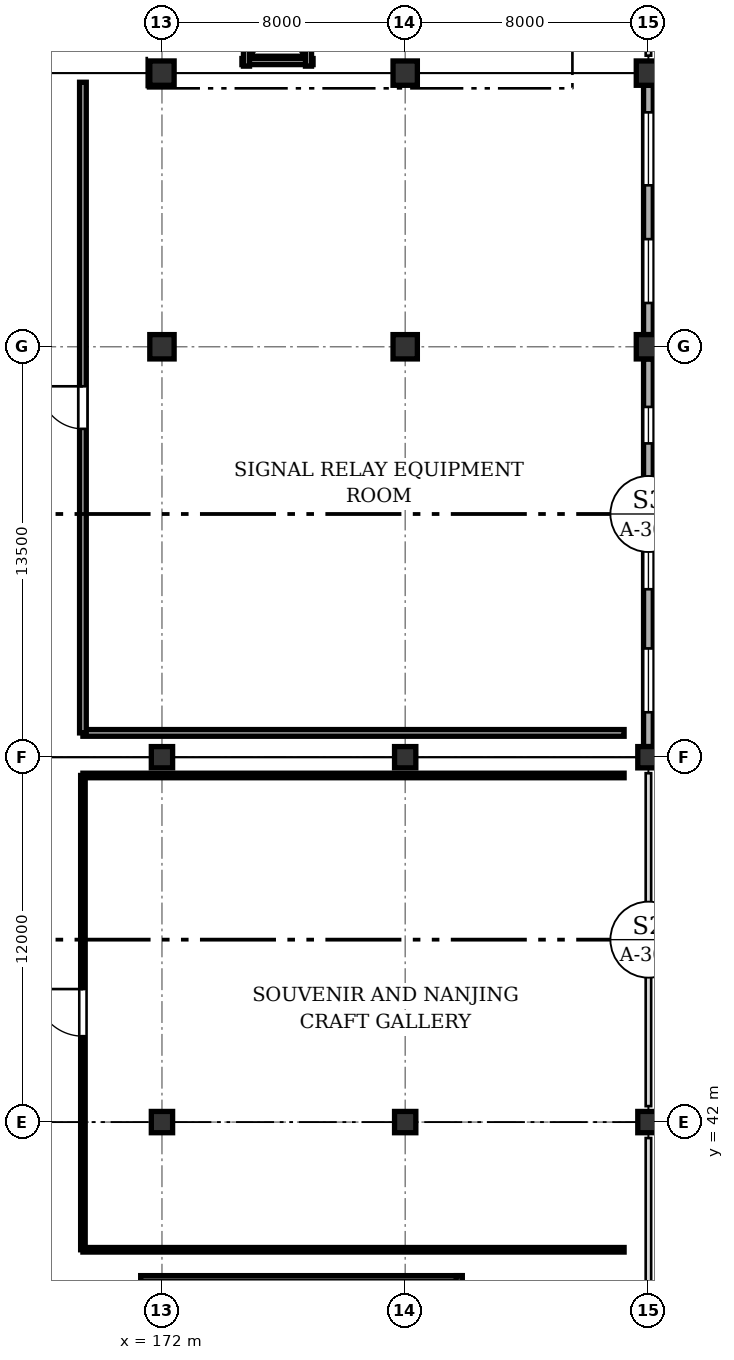
"""IFC4 building model, lengths in metres.
Left out: names, types, materials, properties, quantities, classifications, styles, units other than length and angle.
Written with IfcOpenShell. Run it as: python <this file> out.ifc"""

import sys

from ifc_helpers import new_model, si_unit, direction, frame, frame_2d, origin, origin_2d, place, context, subcontext, project, spatial, rectangle, extrude, element, fill, save


model = new_model("IFC4")
c1 = context("Model", 3, precision=1e-05, world=origin(), true_north=direction((0.0, 1.0)))
c2 = subcontext(c1, "Body", "Model", "MODEL_VIEW")
j1 = project(units=[si_unit("LENGTHUNIT", "METRE"), si_unit("PLANEANGLEUNIT", "RADIAN")], contexts=[c1])
p1 = place(None, origin())
s1 = spatial("IfcSite", under=j1, at=p1, CompositionType="ELEMENT")
p2 = place(p1, origin())
s2 = spatial("IfcBuilding", under=s1, at=p2, CompositionType="ELEMENT")
p3 = place(p2, frame((0.0, 0.0, 6.6)))
s3 = spatial("IfcBuildingStorey", under=s2, at=p3, CompositionType="ELEMENT", Elevation=6.6)
for number, where, z_axis, x_axis in (
    (1, (172.0, 42.0, 0.0), (0.0, 0.0, 1.0), (1.0, 0.0, 0.0)),
    (2, (172.0, 54.0, 0.0), (0.0, 0.0, 1.0), (1.0, 0.0, 0.0)),
):
    element("IfcColumn", number, at=place(p3, frame(where, z_axis=z_axis, x_axis=x_axis)), inside=s3, PredefinedType="COLUMN", context=c2, shape_type="SweptSolid", body=[
        extrude(rectangle(XDim=0.7, YDim=0.7, at=origin_2d()), origin(), (0.0, 0.0, 1.0), 4.2),
    ])
for number, where, z_axis, x_axis in (
    (3, (172.0, 67.5, 0.0), (0.0, 0.0, 1.0), (1.0, 0.0, 0.0)),
    (4, (172.0, 76.5, 0.0), (0.0, 0.0, 1.0), (1.0, 0.0, 0.0)),
):
    element("IfcColumn", number, at=place(p3, frame(where, z_axis=z_axis, x_axis=x_axis)), inside=s3, PredefinedType="COLUMN", context=c2, shape_type="SweptSolid", body=[
        extrude(rectangle(XDim=0.8, YDim=0.8, at=origin_2d()), origin(), (0.0, 0.0, 1.0), 4.2),
    ])
for number, where, z_axis, x_axis in (
    (5, (180.0, 42.0, 0.0), (0.0, 0.0, 1.0), (1.0, 0.0, 0.0)),
    (6, (180.0, 54.0, 0.0), (0.0, 0.0, 1.0), (1.0, 0.0, 0.0)),
):
    element("IfcColumn", number, at=place(p3, frame(where, z_axis=z_axis, x_axis=x_axis)), inside=s3, PredefinedType="COLUMN", context=c2, shape_type="SweptSolid", body=[
        extrude(rectangle(XDim=0.7, YDim=0.7, at=origin_2d()), origin(), (0.0, 0.0, 1.0), 4.2),
    ])
for number, where, z_axis, x_axis in (
    (7, (180.0, 67.5, 0.0), (0.0, 0.0, 1.0), (1.0, 0.0, 0.0)),
    (8, (180.0, 76.5, 0.0), (0.0, 0.0, 1.0), (1.0, 0.0, 0.0)),
):
    element("IfcColumn", number, at=place(p3, frame(where, z_axis=z_axis, x_axis=x_axis)), inside=s3, PredefinedType="COLUMN", context=c2, shape_type="SweptSolid", body=[
        extrude(rectangle(XDim=0.8, YDim=0.8, at=origin_2d()), origin(), (0.0, 0.0, 1.0), 4.2),
    ])
for number, where, z_axis, x_axis in (
    (9, (188.0, 42.0, 0.0), (0.0, 0.0, 1.0), (1.0, 0.0, 0.0)),
    (10, (188.0, 54.0, 0.0), (0.0, 0.0, 1.0), (1.0, 0.0, 0.0)),
):
    element("IfcColumn", number, at=place(p3, frame(where, z_axis=z_axis, x_axis=x_axis)), inside=s3, PredefinedType="COLUMN", context=c2, shape_type="SweptSolid", body=[
        extrude(rectangle(XDim=0.7, YDim=0.7, at=origin_2d()), origin(), (0.0, 0.0, 1.0), 4.2),
    ])
for number, where, z_axis, x_axis in (
    (11, (188.0, 67.5, 0.0), (0.0, 0.0, 1.0), (1.0, 0.0, 0.0)),
    (12, (188.0, 76.5, 0.0), (0.0, 0.0, 1.0), (1.0, 0.0, 0.0)),
):
    element("IfcColumn", number, at=place(p3, frame(where, z_axis=z_axis, x_axis=x_axis)), inside=s3, PredefinedType="COLUMN", context=c2, shape_type="SweptSolid", body=[
        extrude(rectangle(XDim=0.8, YDim=0.8, at=origin_2d()), origin(), (0.0, 0.0, 1.0), 4.2),
    ])
p4 = place(p3, frame((188.0, 67.1, 0.0), z_axis=(0.0, 0.0, 1.0), x_axis=(0.0, -1.0, 0.0)))
e13 = element("IfcWall", 13, at=p4, inside=s3, PredefinedType="SOLIDWALL", context=c2, shape_type="SweptSolid", body=[
    extrude(rectangle(XDim=12.75, YDim=0.32, at=frame_2d((6.375, 0.0))), origin(), (0.0, 0.0, 1.0), 3.345),
])
p5 = place(p4, frame((1.578, 0.0, 0.9)))
e14 = element("IfcOpeningElement", 14, at=p5, cuts=e13, PredefinedType="OPENING", context=c2, shape_type="SweptSolid", body=[
    extrude(rectangle(XDim=1.2, YDim=1.8, at=frame_2d((0.6, 0.9))), frame((0.0, 0.17, 0.0), z_axis=(0.0, -1.0, 0.0), x_axis=(1.0, 0.0, 0.0)), (0.0, 0.0, 1.0), 0.34),
])
p6 = place(p4, frame((5.175, 0.0, 0.9)))
e15 = element("IfcOpeningElement", 15, at=p6, cuts=e13, PredefinedType="OPENING", context=c2, shape_type="SweptSolid", body=[
    extrude(rectangle(XDim=2.4, YDim=1.6, at=frame_2d((1.2, 0.8))), frame((0.0, 0.17, 0.0), z_axis=(0.0, -1.0, 0.0), x_axis=(1.0, 0.0, 0.0)), (0.0, 0.0, 1.0), 0.34),
])
p7 = place(p4, frame((9.522, 0.0, 0.9)))
e16 = element("IfcOpeningElement", 16, at=p7, cuts=e13, PredefinedType="OPENING", context=c2, shape_type="SweptSolid", body=[
    extrude(rectangle(XDim=2.1, YDim=1.6, at=frame_2d((1.05, 0.8))), frame((0.0, 0.17, 0.0), z_axis=(0.0, -1.0, 0.0), x_axis=(1.0, 0.0, 0.0)), (0.0, 0.0, 1.0), 0.34),
])
p8 = place(p3, frame((188.0, 76.1, 0.0), z_axis=(0.0, 0.0, 1.0), x_axis=(0.0, -1.0, 0.0)))
e17 = element("IfcWall", 17, at=p8, inside=s3, PredefinedType="SOLIDWALL", context=c2, shape_type="SweptSolid", body=[
    extrude(rectangle(XDim=8.2, YDim=0.32, at=frame_2d((4.1, 0.0))), origin(), (0.0, 0.0, 1.0), 3.39),
])
p9 = place(p8, frame((0.89, 0.0, 0.9)))
e18 = element("IfcOpeningElement", 18, at=p9, cuts=e17, PredefinedType="OPENING", context=c2, shape_type="SweptSolid", body=[
    extrude(rectangle(XDim=2.4, YDim=1.6, at=frame_2d((1.2, 0.8))), frame((0.0, 0.17, 0.0), z_axis=(0.0, -1.0, 0.0), x_axis=(1.0, 0.0, 0.0)), (0.0, 0.0, 1.0), 0.34),
])
p10 = place(p8, frame((5.06, 0.0, 0.9)))
e19 = element("IfcOpeningElement", 19, at=p10, cuts=e17, PredefinedType="OPENING", context=c2, shape_type="SweptSolid", body=[
    extrude(rectangle(XDim=2.1, YDim=1.6, at=frame_2d((1.05, 0.8))), frame((0.0, 0.17, 0.0), z_axis=(0.0, -1.0, 0.0), x_axis=(1.0, 0.0, 0.0)), (0.0, 0.0, 1.0), 0.34),
])
p11 = place(p3, frame((181.875, 36.85, 0.0), z_axis=(0.0, 0.0, 1.0), x_axis=(-1.0, 0.0, 0.0)))
e20 = element("IfcWall", 20, at=p11, inside=s3, PredefinedType="SOLIDWALL", context=c2, shape_type="SweptSolid", body=[
    extrude(rectangle(XDim=10.575, YDim=0.2, at=frame_2d((5.288, 0.0))), origin(), (0.0, 0.0, 1.0), 1.25),
])
p12 = place(p3, frame((181.775, 32.55, 0.0), z_axis=(0.0, 0.0, 1.0), x_axis=(0.0, 1.0, 0.0)))
e21 = element("IfcWall", 21, at=p12, inside=s3, PredefinedType="SOLIDWALL", context=c2, shape_type="SweptSolid", body=[
    extrude(rectangle(XDim=4.4, YDim=0.2, at=frame_2d((2.2, 0.0))), origin(), (0.0, 0.0, 1.0), 1.25),
])
p13 = place(p3, frame((174.63, 76.88, 0.0), z_axis=(0.0, 0.0, 1.0), x_axis=(1.0, 0.0, 0.0)))
e22 = element("IfcWall", 22, at=p13, inside=s3, PredefinedType="SOLIDWALL", context=c2, shape_type="SweptSolid", body=[
    extrude(rectangle(XDim=2.34, YDim=0.2, at=frame_2d((1.17, 0.0))), origin(), (0.0, 0.0, 1.0), 3.515),
])
for number, where, z_axis, x_axis in (
    (23, (174.78, 79.87, 0.0), (0.0, 0.0, 1.0), (0.0, -1.0, 0.0)),
    (24, (176.82, 76.73, 0.0), (0.0, 0.0, 1.0), (0.0, 1.0, 0.0)),
):
    element("IfcWall", number, at=place(p3, frame(where, z_axis=z_axis, x_axis=x_axis)), inside=s3, PredefinedType="SOLIDWALL", context=c2, shape_type="SweptSolid", body=[
        extrude(rectangle(XDim=3.14, YDim=0.2, at=frame_2d((1.57, 0.0))), origin(), (0.0, 0.0, 1.0), 3.515),
    ])
for number, where, z_axis, x_axis in (
    (25, (187.2, 37.8, 0.0), (0.0, 0.0, 1.0), (-1.0, 0.0, 0.0)),
    (26, (169.4, 53.4, 0.0), (0.0, 0.0, 1.0), (1.0, 0.0, 0.0)),
):
    element("IfcWall", number, at=place(p3, frame(where, z_axis=z_axis, x_axis=x_axis)), inside=s3, PredefinedType="PARTITIONING", context=c2, shape_type="SweptSolid", body=[
        extrude(rectangle(XDim=17.8, YDim=0.15, at=frame_2d((8.9, 0.0))), origin(), (0.0, 0.0, 1.0), 3.345),
    ])
p14 = place(p3, frame((169.4, 37.8, 0.0), z_axis=(0.0, 0.0, 1.0), x_axis=(0.0, 1.0, 0.0)))
e27 = element("IfcWall", 27, at=p14, inside=s3, PredefinedType="PARTITIONING", context=c2, shape_type="SweptSolid", body=[
    extrude(rectangle(XDim=15.6, YDim=0.15, at=frame_2d((7.8, 0.0))), origin(), (0.0, 0.0, 1.0), 3.485),
])
p15 = place(p14, frame((7.025, 0.0, 0.0)))
e28 = element("IfcOpeningElement", 28, at=p15, cuts=e27, PredefinedType="OPENING", context=c2, shape_type="SweptSolid", body=[
    extrude(rectangle(XDim=1.55, YDim=2.1, at=frame_2d((0.775, 1.05))), frame((0.0, 0.085, 0.0), z_axis=(0.0, -1.0, 0.0), x_axis=(1.0, 0.0, 0.0)), (0.0, 0.0, 1.0), 0.17),
])
p16 = place(p3, frame((187.2, 54.8, 0.0), z_axis=(0.0, 0.0, 1.0), x_axis=(-1.0, 0.0, 0.0)))
e29 = element("IfcWall", 29, at=p16, inside=s3, PredefinedType="SOLIDWALL", context=c2, shape_type="SweptSolid", body=[
    extrude(rectangle(XDim=17.8, YDim=0.22, at=frame_2d((8.9, 0.0))), origin(), (0.0, 0.0, 1.0), 3.37),
])
p17 = place(p3, frame((169.4, 54.8, 0.0), z_axis=(0.0, 0.0, 1.0), x_axis=(0.0, 1.0, 0.0)))
e30 = element("IfcWall", 30, at=p17, inside=s3, PredefinedType="SOLIDWALL", context=c2, shape_type="SweptSolid", body=[
    extrude(rectangle(XDim=21.4, YDim=0.22, at=frame_2d((10.7, 0.0))), origin(), (0.0, 0.0, 1.0), 3.485),
])
p18 = place(p17, frame((10.0, 0.0, 0.0)))
e31 = element("IfcOpeningElement", 31, at=p18, cuts=e30, PredefinedType="OPENING", context=c2, shape_type="SweptSolid", body=[
    extrude(rectangle(XDim=1.4, YDim=2.1, at=frame_2d((0.7, 1.05))), frame((0.0, 0.12, 0.0), z_axis=(0.0, -1.0, 0.0), x_axis=(1.0, 0.0, 0.0)), (0.0, 0.0, 1.0), 0.24),
])
p19 = place(p5, origin())
e32 = element("IfcWindow", 32, at=p19, inside=s3, PartitioningType="SINGLE_PANEL", PredefinedType="WINDOW", context=c2, shape_type="SweptSolid", body=[
    extrude(rectangle(XDim=1.2, YDim=1.8, at=frame_2d((0.6, 0.9))), frame((0.0, 0.03, 0.0), z_axis=(0.0, -1.0, 0.0), x_axis=(1.0, 0.0, 0.0)), (0.0, 0.0, 1.0), 0.06),
])
fill(e14, e32)
p20 = place(p6, origin())
e33 = element("IfcWindow", 33, at=p20, inside=s3, PartitioningType="SINGLE_PANEL", PredefinedType="WINDOW", context=c2, shape_type="SweptSolid", body=[
    extrude(rectangle(XDim=2.4, YDim=1.6, at=frame_2d((1.2, 0.8))), frame((0.0, 0.03, 0.0), z_axis=(0.0, -1.0, 0.0), x_axis=(1.0, 0.0, 0.0)), (0.0, 0.0, 1.0), 0.06),
])
fill(e15, e33)
p21 = place(p7, origin())
e34 = element("IfcWindow", 34, at=p21, inside=s3, PartitioningType="SINGLE_PANEL", PredefinedType="WINDOW", context=c2, shape_type="SweptSolid", body=[
    extrude(rectangle(XDim=2.1, YDim=1.6, at=frame_2d((1.05, 0.8))), frame((0.0, 0.03, 0.0), z_axis=(0.0, -1.0, 0.0), x_axis=(1.0, 0.0, 0.0)), (0.0, 0.0, 1.0), 0.06),
])
fill(e16, e34)
p22 = place(p9, origin())
e35 = element("IfcWindow", 35, at=p22, inside=s3, PartitioningType="SINGLE_PANEL", PredefinedType="WINDOW", context=c2, shape_type="SweptSolid", body=[
    extrude(rectangle(XDim=2.4, YDim=1.6, at=frame_2d((1.2, 0.8))), frame((0.0, 0.03, 0.0), z_axis=(0.0, -1.0, 0.0), x_axis=(1.0, 0.0, 0.0)), (0.0, 0.0, 1.0), 0.06),
])
fill(e18, e35)
p23 = place(p10, origin())
e36 = element("IfcWindow", 36, at=p23, inside=s3, PartitioningType="SINGLE_PANEL", PredefinedType="WINDOW", context=c2, shape_type="SweptSolid", body=[
    extrude(rectangle(XDim=2.1, YDim=1.6, at=frame_2d((1.05, 0.8))), frame((0.0, 0.03, 0.0), z_axis=(0.0, -1.0, 0.0), x_axis=(1.0, 0.0, 0.0)), (0.0, 0.0, 1.0), 0.06),
])
fill(e19, e36)
p24 = place(p15, origin())
e37 = element("IfcDoor", 37, at=p24, inside=s3, OperationType="SINGLE_SWING_RIGHT", PredefinedType="DOOR", context=c2, shape_type="SweptSolid", body=[
    extrude(rectangle(XDim=1.55, YDim=2.1, at=frame_2d((0.775, 1.05))), frame((0.0, 0.025, 0.0), z_axis=(0.0, -1.0, 0.0), x_axis=(1.0, 0.0, 0.0)), (0.0, 0.0, 1.0), 0.05),
])
fill(e28, e37)
p25 = place(p18, origin())
e38 = element("IfcDoor", 38, at=p25, inside=s3, OperationType="SINGLE_SWING_RIGHT", PredefinedType="DOOR", context=c2, shape_type="SweptSolid", body=[
    extrude(rectangle(XDim=1.4, YDim=2.1, at=frame_2d((0.7, 1.05))), frame((0.0, 0.025, 0.0), z_axis=(0.0, -1.0, 0.0), x_axis=(1.0, 0.0, 0.0)), (0.0, 0.0, 1.0), 0.05),
])
fill(e31, e38)
save(model, sys.argv[1])
